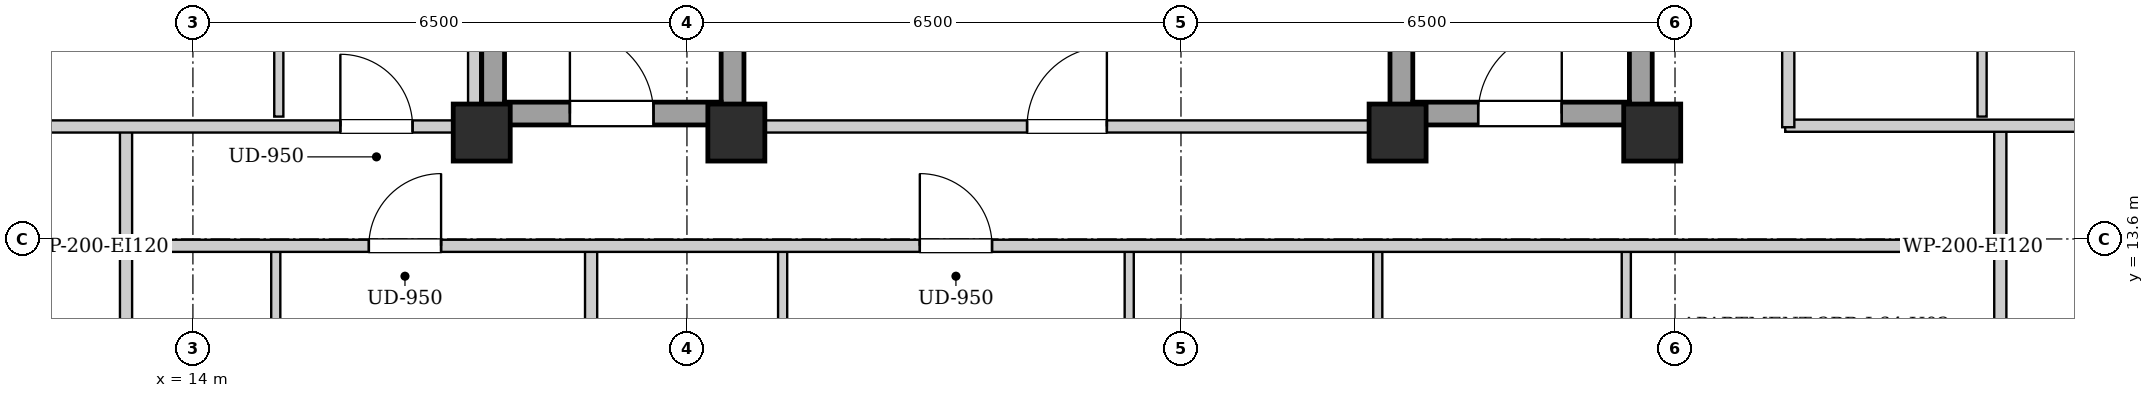
"""IFC4 building model, lengths in metres.
Left out: names, types, materials, properties, quantities, classifications, styles, units other than length and angle.
Written with IfcOpenShell. Run it as: python <this file> out.ifc"""

import sys

from ifc_helpers import new_model, si_unit, direction, frame, frame_2d, origin, origin_2d, place, context, subcontext, project, spatial, rectangle, extrude, element, fill, save


model = new_model("IFC4")
c1 = context("Model", 3, precision=1e-05, world=origin(), true_north=direction((0.0, 1.0)))
c2 = subcontext(c1, "Body", "Model", "MODEL_VIEW")
j1 = project(units=[si_unit("LENGTHUNIT", "METRE"), si_unit("PLANEANGLEUNIT", "RADIAN")], contexts=[c1])
p1 = place(None, origin())
s1 = spatial("IfcSite", under=j1, at=p1, CompositionType="ELEMENT")
p2 = place(p1, origin())
s2 = spatial("IfcBuilding", under=s1, at=p2, CompositionType="ELEMENT")
p3 = place(p2, frame((0.0, 0.0, 220.7)))
s3 = spatial("IfcBuildingStorey", under=s2, at=p3, CompositionType="ELEMENT", Elevation=220.7)
for number, where, z_axis, x_axis in (
    (1, (17.8, 15.0, 0.0), (0.0, 0.0, 1.0), (1.0, 0.0, 0.0)),
    (2, (21.15, 15.0, 0.0), (0.0, 0.0, 1.0), (1.0, 0.0, 0.0)),
    (3, (29.85, 15.0, 0.0), (0.0, 0.0, 1.0), (1.0, 0.0, 0.0)),
    (4, (33.2, 15.0, 0.0), (0.0, 0.0, 1.0), (1.0, 0.0, 0.0)),
):
    element("IfcColumn", number, at=place(p3, frame(where, z_axis=z_axis, x_axis=x_axis)), inside=s3, PredefinedType="COLUMN", context=c2, shape_type="SweptSolid", body=[
        extrude(rectangle(XDim=0.75, YDim=0.75, at=origin_2d()), origin(), (0.0, 0.0, 1.0), 3.4),
    ])
for number, where, z_axis, x_axis in (
    (5, (17.95, 15.1, 0.0), (0.0, 0.0, 1.0), (0.0, 1.0, 0.0)),
    (6, (21.1, 15.1, 0.0), (0.0, 0.0, 1.0), (0.0, 1.0, 0.0)),
):
    element("IfcWall", number, at=place(p3, frame(where, z_axis=z_axis, x_axis=x_axis)), inside=s3, PredefinedType="SHEAR", context=c2, shape_type="SweptSolid", body=[
        extrude(rectangle(XDim=9.0, YDim=0.3, at=frame_2d((4.5, 0.0))), origin(), (0.0, 0.0, 1.0), 3.14),
    ])
p4 = place(p3, frame((18.1, 15.25, 0.0), z_axis=(0.0, 0.0, 1.0), x_axis=(1.0, 0.0, 0.0)))
e7 = element("IfcWall", 7, at=p4, inside=s3, PredefinedType="SHEAR", context=c2, shape_type="SweptSolid", body=[
    extrude(rectangle(XDim=2.85, YDim=0.3, at=frame_2d((1.425, 0.0))), origin(), (0.0, 0.0, 1.0), 3.14),
])
p5 = place(p4, frame((0.86, 0.0, 0.0)))
e8 = element("IfcOpeningElement", 8, at=p5, cuts=e7, PredefinedType="OPENING", context=c2, shape_type="SweptSolid", body=[
    extrude(rectangle(XDim=1.1, YDim=2.05, at=frame_2d((0.55, 1.025))), frame((0.0, 0.16, 0.0), z_axis=(0.0, -1.0, 0.0), x_axis=(1.0, 0.0, 0.0)), (0.0, 0.0, 1.0), 0.32),
])
for number, where, z_axis, x_axis in (
    (9, (29.9, 15.1, 0.0), (0.0, 0.0, 1.0), (0.0, 1.0, 0.0)),
    (10, (33.05, 15.1, 0.0), (0.0, 0.0, 1.0), (0.0, 1.0, 0.0)),
):
    element("IfcWall", number, at=place(p3, frame(where, z_axis=z_axis, x_axis=x_axis)), inside=s3, PredefinedType="SHEAR", context=c2, shape_type="SweptSolid", body=[
        extrude(rectangle(XDim=9.0, YDim=0.3, at=frame_2d((4.5, 0.0))), origin(), (0.0, 0.0, 1.0), 3.14),
    ])
p6 = place(p3, frame((30.05, 15.25, 0.0), z_axis=(0.0, 0.0, 1.0), x_axis=(1.0, 0.0, 0.0)))
e11 = element("IfcWall", 11, at=p6, inside=s3, PredefinedType="SHEAR", context=c2, shape_type="SweptSolid", body=[
    extrude(rectangle(XDim=2.85, YDim=0.3, at=frame_2d((1.425, 0.0))), origin(), (0.0, 0.0, 1.0), 3.14),
])
p7 = place(p6, frame((0.86, 0.0, 0.0)))
e12 = element("IfcOpeningElement", 12, at=p7, cuts=e11, PredefinedType="OPENING", context=c2, shape_type="SweptSolid", body=[
    extrude(rectangle(XDim=1.1, YDim=2.05, at=frame_2d((0.55, 1.025))), frame((0.0, 0.16, 0.0), z_axis=(0.0, -1.0, 0.0), x_axis=(1.0, 0.0, 0.0)), (0.0, 0.0, 1.0), 0.32),
])
p8 = place(p3, frame((21.25, 15.08, 0.0), z_axis=(0.0, 0.0, 1.0), x_axis=(1.0, 0.0, 0.0)))
e13 = element("IfcWall", 13, at=p8, inside=s3, PredefinedType="PARTITIONING", context=c2, shape_type="SweptSolid", body=[
    extrude(rectangle(XDim=8.5, YDim=0.16, at=frame_2d((4.25, 0.0))), origin(), (0.0, 0.0, 1.0), 2.668),
])
p9 = place(p8, frame((3.725, 0.0, 0.0)))
e14 = element("IfcOpeningElement", 14, at=p9, cuts=e13, PredefinedType="OPENING", context=c2, shape_type="SweptSolid", body=[
    extrude(rectangle(XDim=1.05, YDim=2.05, at=frame_2d((0.525, 1.025))), frame((0.0, 0.09, 0.0), z_axis=(0.0, -1.0, 0.0), x_axis=(1.0, 0.0, 0.0)), (0.0, 0.0, 1.0), 0.18),
])
for number, where, z_axis, x_axis in (
    (15, (13.12, 13.51, 0.0), (0.0, 0.0, 1.0), (0.0, 1.0, 0.0)),
    (16, (37.78, 13.51, 0.0), (0.0, 0.0, 1.0), (0.0, 1.0, 0.0)),
):
    element("IfcWall", number, at=place(p3, frame(where, z_axis=z_axis, x_axis=x_axis)), inside=s3, PredefinedType="PARTITIONING", context=c2, shape_type="SweptSolid", body=[
        extrude(rectangle(XDim=1.58, YDim=0.16, at=frame_2d((0.79, 0.0))), origin(), (0.0, 0.0, 1.0), 3.14),
    ])
p10 = place(p3, frame((34.95, 15.09, 0.0), z_axis=(0.0, 0.0, 1.0), x_axis=(1.0, 0.0, 0.0)))
e17 = element("IfcWall", 17, at=p10, inside=s3, PredefinedType="PARTITIONING", context=c2, shape_type="SweptSolid", body=[
    extrude(rectangle(XDim=5.07, YDim=0.16, at=frame_2d((2.535, 0.0))), origin(), (0.0, 0.0, 1.0), 2.668),
])
p11 = place(p3, frame((13.12, 10.56, 0.0), z_axis=(0.0, 0.0, 1.0), x_axis=(0.0, 1.0, 0.0)))
e18 = element("IfcWall", 18, at=p11, inside=s3, PredefinedType="PARTITIONING", context=c2, shape_type="SweptSolid", body=[
    extrude(rectangle(XDim=2.91, YDim=0.16, at=frame_2d((1.455, 0.0))), origin(), (0.0, 0.0, 1.0), 3.14),
])
p12 = place(p3, frame((15.09, 10.62, 0.0), z_axis=(0.0, 0.0, 1.0), x_axis=(0.0, 1.0, 0.0)))
e19 = element("IfcWall", 19, at=p12, inside=s3, PredefinedType="PARTITIONING", context=c2, shape_type="SweptSolid", body=[
    extrude(rectangle(XDim=2.85, YDim=0.12, at=frame_2d((1.425, 0.0))), origin(), (0.0, 0.0, 1.0), 3.14),
])
p13 = place(p12, frame((0.995, 0.0, 0.0)))
e20 = element("IfcOpeningElement", 20, at=p13, cuts=e19, PredefinedType="OPENING", context=c2, shape_type="SweptSolid", body=[
    extrude(rectangle(XDim=0.86, YDim=2.05, at=frame_2d((0.43, 1.025))), frame((0.0, 0.07, 0.0), z_axis=(0.0, -1.0, 0.0), x_axis=(1.0, 0.0, 0.0)), (0.0, 0.0, 1.0), 0.14),
])
p14 = place(p3, frame((37.78, 10.56, 0.0), z_axis=(0.0, 0.0, 1.0), x_axis=(0.0, 1.0, 0.0)))
e21 = element("IfcWall", 21, at=p14, inside=s3, PredefinedType="PARTITIONING", context=c2, shape_type="SweptSolid", body=[
    extrude(rectangle(XDim=2.91, YDim=0.16, at=frame_2d((1.455, 0.0))), origin(), (0.0, 0.0, 1.0), 3.14),
])
p15 = place(p3, frame((19.239, 6.06, 0.0), z_axis=(0.0, 0.0, 1.0), x_axis=(0.0, 1.0, 0.0)))
e22 = element("IfcWall", 22, at=p15, inside=s3, PredefinedType="PARTITIONING", context=c2, shape_type="SweptSolid", body=[
    extrude(rectangle(XDim=7.41, YDim=0.16, at=frame_2d((3.705, 0.0))), origin(), (0.0, 0.0, 1.0), 3.14),
])
p16 = place(p3, frame((21.759, 10.62, 0.0), z_axis=(0.0, 0.0, 1.0), x_axis=(0.0, 1.0, 0.0)))
e23 = element("IfcWall", 23, at=p16, inside=s3, PredefinedType="PARTITIONING", context=c2, shape_type="SweptSolid", body=[
    extrude(rectangle(XDim=2.85, YDim=0.12, at=frame_2d((1.425, 0.0))), origin(), (0.0, 0.0, 1.0), 3.14),
])
p17 = place(p16, frame((0.995, 0.0, 0.0)))
e24 = element("IfcOpeningElement", 24, at=p17, cuts=e23, PredefinedType="OPENING", context=c2, shape_type="SweptSolid", body=[
    extrude(rectangle(XDim=0.86, YDim=2.05, at=frame_2d((0.43, 1.025))), frame((0.0, 0.07, 0.0), z_axis=(0.0, -1.0, 0.0), x_axis=(1.0, 0.0, 0.0)), (0.0, 0.0, 1.0), 0.14),
])
p18 = place(p3, frame((26.319, 10.62, 0.0), z_axis=(0.0, 0.0, 1.0), x_axis=(0.0, 1.0, 0.0)))
e25 = element("IfcWall", 25, at=p18, inside=s3, PredefinedType="PARTITIONING", context=c2, shape_type="SweptSolid", body=[
    extrude(rectangle(XDim=2.85, YDim=0.12, at=frame_2d((1.425, 0.0))), origin(), (0.0, 0.0, 1.0), 3.14),
])
p19 = place(p18, frame((0.975, 0.0, 0.0)))
e26 = element("IfcOpeningElement", 26, at=p19, cuts=e25, PredefinedType="OPENING", context=c2, shape_type="SweptSolid", body=[
    extrude(rectangle(XDim=0.9, YDim=2.05, at=frame_2d((0.45, 1.025))), frame((0.0, 0.07, 0.0), z_axis=(0.0, -1.0, 0.0), x_axis=(1.0, 0.0, 0.0)), (0.0, 0.0, 1.0), 0.14),
])
p20 = place(p3, frame((29.589, 10.62, 0.0), z_axis=(0.0, 0.0, 1.0), x_axis=(0.0, 1.0, 0.0)))
e27 = element("IfcWall", 27, at=p20, inside=s3, PredefinedType="PARTITIONING", context=c2, shape_type="SweptSolid", body=[
    extrude(rectangle(XDim=2.85, YDim=0.12, at=frame_2d((1.425, 0.0))), origin(), (0.0, 0.0, 1.0), 3.14),
])
p21 = place(p20, frame((0.975, 0.0, 0.0)))
e28 = element("IfcOpeningElement", 28, at=p21, cuts=e27, PredefinedType="OPENING", context=c2, shape_type="SweptSolid", body=[
    extrude(rectangle(XDim=0.9, YDim=2.05, at=frame_2d((0.45, 1.025))), frame((0.0, 0.07, 0.0), z_axis=(0.0, -1.0, 0.0), x_axis=(1.0, 0.0, 0.0)), (0.0, 0.0, 1.0), 0.14),
])
p22 = place(p3, frame((32.859, 10.62, 0.0), z_axis=(0.0, 0.0, 1.0), x_axis=(0.0, 1.0, 0.0)))
e29 = element("IfcWall", 29, at=p22, inside=s3, PredefinedType="PARTITIONING", context=c2, shape_type="SweptSolid", body=[
    extrude(rectangle(XDim=2.85, YDim=0.12, at=frame_2d((1.425, 0.0))), origin(), (0.0, 0.0, 1.0), 3.14),
])
p23 = place(p22, frame((0.975, 0.0, 0.0)))
e30 = element("IfcOpeningElement", 30, at=p23, cuts=e29, PredefinedType="OPENING", context=c2, shape_type="SweptSolid", body=[
    extrude(rectangle(XDim=0.9, YDim=2.05, at=frame_2d((0.45, 1.025))), frame((0.0, 0.07, 0.0), z_axis=(0.0, -1.0, 0.0), x_axis=(1.0, 0.0, 0.0)), (0.0, 0.0, 1.0), 0.14),
])
p24 = place(p3, frame((10.88, 15.08, 0.0), z_axis=(0.0, 0.0, 1.0), x_axis=(1.0, 0.0, 0.0)))
e31 = element("IfcWall", 31, at=p24, inside=s3, PredefinedType="PARTITIONING", context=c2, shape_type="SweptSolid", body=[
    extrude(rectangle(XDim=6.88, YDim=0.16, at=frame_2d((3.44, 0.0))), origin(), (0.0, 0.0, 1.0), 2.668),
])
p25 = place(p24, frame((5.06, 0.0, 0.0)))
e32 = element("IfcOpeningElement", 32, at=p25, cuts=e31, PredefinedType="OPENING", context=c2, shape_type="SweptSolid", body=[
    extrude(rectangle(XDim=0.95, YDim=2.1, at=frame_2d((0.475, 1.05))), frame((0.0, 0.09, 0.0), z_axis=(0.0, -1.0, 0.0), x_axis=(1.0, 0.0, 0.0)), (0.0, 0.0, 1.0), 0.18),
])
p26 = place(p3, frame((15.13, 15.21, 0.0), z_axis=(0.0, 0.0, 1.0), x_axis=(0.0, 1.0, 0.0)))
e33 = element("IfcWall", 33, at=p26, inside=s3, PredefinedType="PARTITIONING", context=c2, shape_type="SweptSolid", body=[
    extrude(rectangle(XDim=4.308, YDim=0.12, at=frame_2d((2.154, 0.0))), origin(), (0.0, 0.0, 1.0), 3.14),
])
p27 = place(p26, frame((1.704, 0.0, 0.0)))
e34 = element("IfcOpeningElement", 34, at=p27, cuts=e33, PredefinedType="OPENING", context=c2, shape_type="SweptSolid", body=[
    extrude(rectangle(XDim=0.9, YDim=2.05, at=frame_2d((0.45, 1.025))), frame((0.0, 0.07, 0.0), z_axis=(0.0, -1.0, 0.0), x_axis=(1.0, 0.0, 0.0)), (0.0, 0.0, 1.0), 0.14),
])
p28 = place(p3, frame((37.54, 15.21, 0.0), z_axis=(0.0, 0.0, 1.0), x_axis=(0.0, 1.0, 0.0)))
e35 = element("IfcWall", 35, at=p28, inside=s3, PredefinedType="PARTITIONING", context=c2, shape_type="SweptSolid", body=[
    extrude(rectangle(XDim=2.159, YDim=0.12, at=frame_2d((1.08, 0.0))), origin(), (0.0, 0.0, 1.0), 3.14),
])
p29 = place(p3, frame((13.15, 13.51, 0.0), z_axis=(0.0, 0.0, 1.0), x_axis=(1.0, 0.0, 0.0)))
e36 = element("IfcWall", 36, at=p29, inside=s3, PredefinedType="PARTITIONING", context=c2, shape_type="SweptSolid", body=[
    extrude(rectangle(XDim=24.6, YDim=0.16, at=frame_2d((12.3, 0.0))), origin(), (0.0, 0.0, 1.0), 3.14),
])
p30 = place(p29, frame((3.165, 0.0, 0.0)))
e37 = element("IfcOpeningElement", 37, at=p30, cuts=e36, PredefinedType="OPENING", context=c2, shape_type="SweptSolid", body=[
    extrude(rectangle(XDim=0.95, YDim=2.1, at=frame_2d((0.475, 1.05))), frame((0.0, 0.09, 0.0), z_axis=(0.0, -1.0, 0.0), x_axis=(1.0, 0.0, 0.0)), (0.0, 0.0, 1.0), 0.18),
])
p31 = place(p29, frame((10.414, 0.0, 0.0)))
e38 = element("IfcOpeningElement", 38, at=p31, cuts=e36, PredefinedType="OPENING", context=c2, shape_type="SweptSolid", body=[
    extrude(rectangle(XDim=0.95, YDim=2.1, at=frame_2d((0.475, 1.05))), frame((0.0, 0.09, 0.0), z_axis=(0.0, -1.0, 0.0), x_axis=(1.0, 0.0, 0.0)), (0.0, 0.0, 1.0), 0.18),
])
p32 = place(p3, frame((17.7, 15.02, 0.0), z_axis=(0.0, 0.0, 1.0), x_axis=(0.0, 1.0, 0.0)))
e39 = element("IfcWall", 39, at=p32, inside=s3, PredefinedType="PARTITIONING", context=c2, shape_type="SweptSolid", body=[
    extrude(rectangle(XDim=13.98, YDim=0.16, at=frame_2d((6.99, 0.0))), origin(), (0.0, 0.0, 1.0), 3.14),
])
p33 = place(p3, frame((34.99, 15.07, 0.0), z_axis=(0.0, 0.0, 1.0), x_axis=(0.0, 1.0, 0.0)))
e40 = element("IfcWall", 40, at=p33, inside=s3, PredefinedType="PARTITIONING", context=c2, shape_type="SweptSolid", body=[
    extrude(rectangle(XDim=13.93, YDim=0.16, at=frame_2d((6.965, 0.0))), origin(), (0.0, 0.0, 1.0), 3.14),
])
p34 = place(p33, frame((4.661, 0.0, 0.0)))
e41 = element("IfcOpeningElement", 41, at=p34, cuts=e40, PredefinedType="OPENING", context=c2, shape_type="SweptSolid", body=[
    extrude(rectangle(XDim=0.95, YDim=2.1, at=frame_2d((0.475, 1.05))), frame((0.0, 0.09, 0.0), z_axis=(0.0, -1.0, 0.0), x_axis=(1.0, 0.0, 0.0)), (0.0, 0.0, 1.0), 0.18),
])
p35 = place(p33, frame((11.411, 0.0, 0.0)))
e42 = element("IfcOpeningElement", 42, at=p35, cuts=e40, PredefinedType="OPENING", context=c2, shape_type="SweptSolid", body=[
    extrude(rectangle(XDim=0.95, YDim=2.1, at=frame_2d((0.475, 1.05))), frame((0.0, 0.09, 0.0), z_axis=(0.0, -1.0, 0.0), x_axis=(1.0, 0.0, 0.0)), (0.0, 0.0, 1.0), 0.18),
])
p36 = place(p5, origin())
e43 = element("IfcDoor", 43, at=p36, inside=s3, OperationType="SINGLE_SWING_LEFT", PredefinedType="DOOR", context=c2, shape_type="SweptSolid", body=[
    extrude(rectangle(XDim=1.1, YDim=2.05, at=frame_2d((0.55, 1.025))), frame((0.0, 0.025, 0.0), z_axis=(0.0, -1.0, 0.0), x_axis=(1.0, 0.0, 0.0)), (0.0, 0.0, 1.0), 0.05),
])
fill(e8, e43)
p37 = place(p7, origin())
e44 = element("IfcDoor", 44, at=p37, inside=s3, OperationType="SINGLE_SWING_RIGHT", PredefinedType="DOOR", context=c2, shape_type="SweptSolid", body=[
    extrude(rectangle(XDim=1.1, YDim=2.05, at=frame_2d((0.55, 1.025))), frame((0.0, 0.025, 0.0), z_axis=(0.0, -1.0, 0.0), x_axis=(1.0, 0.0, 0.0)), (0.0, 0.0, 1.0), 0.05),
])
fill(e12, e44)
p38 = place(p9, origin())
e45 = element("IfcDoor", 45, at=p38, inside=s3, OperationType="SINGLE_SWING_RIGHT", PredefinedType="DOOR", context=c2, shape_type="SweptSolid", body=[
    extrude(rectangle(XDim=1.05, YDim=2.05, at=frame_2d((0.525, 1.025))), frame((0.0, 0.025, 0.0), z_axis=(0.0, -1.0, 0.0), x_axis=(1.0, 0.0, 0.0)), (0.0, 0.0, 1.0), 0.05),
])
fill(e14, e45)
p39 = place(p25, origin())
e46 = element("IfcDoor", 46, at=p39, inside=s3, OperationType="SINGLE_SWING_LEFT", PredefinedType="DOOR", context=c2, shape_type="SweptSolid", body=[
    extrude(rectangle(XDim=0.95, YDim=2.1, at=frame_2d((0.475, 1.05))), frame((0.0, 0.025, 0.0), z_axis=(0.0, -1.0, 0.0), x_axis=(1.0, 0.0, 0.0)), (0.0, 0.0, 1.0), 0.05),
])
fill(e32, e46)
p40 = place(p30, origin())
e47 = element("IfcDoor", 47, at=p40, inside=s3, OperationType="SINGLE_SWING_RIGHT", PredefinedType="DOOR", context=c2, shape_type="SweptSolid", body=[
    extrude(rectangle(XDim=0.95, YDim=2.1, at=frame_2d((0.475, 1.05))), frame((0.0, 0.025, 0.0), z_axis=(0.0, -1.0, 0.0), x_axis=(1.0, 0.0, 0.0)), (0.0, 0.0, 1.0), 0.05),
])
fill(e37, e47)
p41 = place(p31, origin())
e48 = element("IfcDoor", 48, at=p41, inside=s3, OperationType="SINGLE_SWING_LEFT", PredefinedType="DOOR", context=c2, shape_type="SweptSolid", body=[
    extrude(rectangle(XDim=0.95, YDim=2.1, at=frame_2d((0.475, 1.05))), frame((0.0, 0.025, 0.0), z_axis=(0.0, -1.0, 0.0), x_axis=(1.0, 0.0, 0.0)), (0.0, 0.0, 1.0), 0.05),
])
fill(e38, e48)
save(model, sys.argv[1])
